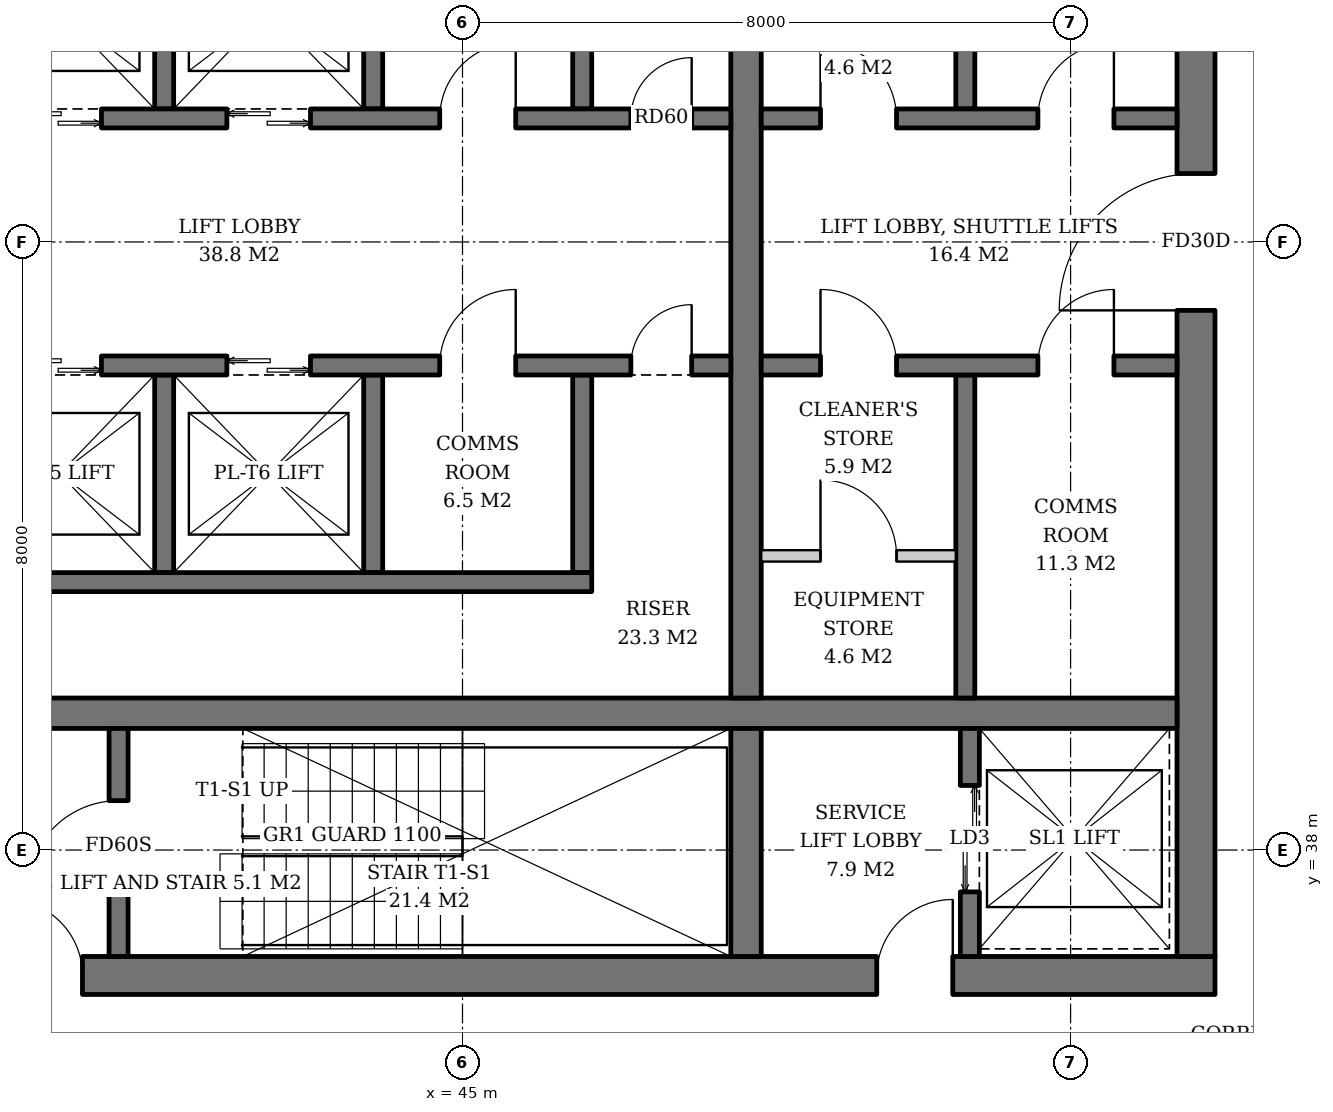
"""IFC4 building model, lengths in metres.
Left out: names, types, materials, properties, quantities, classifications, styles, units other than length and angle.
Written with IfcOpenShell. Run it as: python <this file> out.ifc"""

import sys

from ifc_helpers import new_model, si_unit, direction, frame, frame_2d, origin, place, context, subcontext, project, spatial, rectangle, extrude, element, fill, save


model = new_model("IFC4")
c1 = context("Model", 3, precision=1e-05, world=origin(), true_north=direction((0.0, 1.0)))
c2 = subcontext(c1, "Body", "Model", "MODEL_VIEW")
j1 = project(units=[si_unit("LENGTHUNIT", "METRE"), si_unit("PLANEANGLEUNIT", "RADIAN")], contexts=[c1])
p1 = place(None, origin())
s1 = spatial("IfcSite", under=j1, at=p1, CompositionType="ELEMENT")
p2 = place(p1, origin())
s2 = spatial("IfcBuilding", under=s1, at=p2, CompositionType="ELEMENT")
p3 = place(p2, frame((0.0, 0.0, 249.0)))
s3 = spatial("IfcBuildingStorey", under=s2, at=p3, CompositionType="ELEMENT", Elevation=249.0)
p4 = place(p3, frame((35.1, 36.35, 0.0), z_axis=(0.0, 0.0, 1.0), x_axis=(1.0, 0.0, 0.0)))
e1 = element("IfcWall", 1, at=p4, inside=s3, PredefinedType="SHEAR", context=c2, shape_type="SweptSolid", body=[
    extrude(rectangle(XDim=19.8, YDim=0.5, at=frame_2d((9.9, 0.0))), origin(), (0.0, 0.0, 1.0), 3.8),
])
p5 = place(p4, frame((3.9, 0.0, 0.0)))
e2 = element("IfcOpeningElement", 2, at=p5, cuts=e1, PredefinedType="OPENING", context=c2, shape_type="SweptSolid", body=[
    extrude(rectangle(XDim=1.0, YDim=2.1, at=frame_2d((0.5, 1.05))), frame((0.0, 0.26, 0.0), z_axis=(0.0, -1.0, 0.0), x_axis=(1.0, 0.0, 0.0)), (0.0, 0.0, 1.0), 0.52),
])
p6 = place(p4, frame((15.35, 0.0, 0.0)))
e3 = element("IfcOpeningElement", 3, at=p6, cuts=e1, PredefinedType="OPENING", context=c2, shape_type="SweptSolid", body=[
    extrude(rectangle(XDim=1.0, YDim=2.1, at=frame_2d((0.5, 1.05))), frame((0.0, 0.26, 0.0), z_axis=(0.0, -1.0, 0.0), x_axis=(1.0, 0.0, 0.0)), (0.0, 0.0, 1.0), 0.52),
])
p7 = place(p3, frame((54.65, 36.6, 0.0), z_axis=(0.0, 0.0, 1.0), x_axis=(0.0, 1.0, 0.0)))
e4 = element("IfcWall", 4, at=p7, inside=s3, PredefinedType="SHEAR", context=c2, shape_type="SweptSolid", body=[
    extrude(rectangle(XDim=18.8, YDim=0.5, at=frame_2d((9.4, 0.0))), origin(), (0.0, 0.0, 1.0), 3.8),
])
p8 = place(p7, frame((8.5, 0.0, 0.0)))
e5 = element("IfcOpeningElement", 5, at=p8, cuts=e4, PredefinedType="OPENING", context=c2, shape_type="SweptSolid", body=[
    extrude(rectangle(XDim=1.8, YDim=2.4, at=frame_2d((0.9, 1.2))), frame((0.0, 0.26, 0.0), z_axis=(0.0, -1.0, 0.0), x_axis=(1.0, 0.0, 0.0)), (0.0, 0.0, 1.0), 0.52),
])
p9 = place(p3, frame((35.6, 39.8, 0.0), z_axis=(0.0, 0.0, 1.0), x_axis=(1.0, 0.0, 0.0)))
e6 = element("IfcWall", 6, at=p9, inside=s3, PredefinedType="SHEAR", context=c2, shape_type="SweptSolid", body=[
    extrude(rectangle(XDim=18.8, YDim=0.4, at=frame_2d((9.4, 0.0))), origin(), (0.0, 0.0, 1.0), 3.8),
])
p10 = place(p3, frame((48.73, 36.6, 0.0), z_axis=(0.0, 0.0, 1.0), x_axis=(0.0, 1.0, 0.0)))
e7 = element("IfcWall", 7, at=p10, inside=s3, PredefinedType="SHEAR", context=c2, shape_type="SweptSolid", body=[
    extrude(rectangle(XDim=3.0, YDim=0.4, at=frame_2d((1.5, 0.0))), origin(), (0.0, 0.0, 1.0), 3.8),
])
p11 = place(p3, frame((48.73, 40.0, 0.0), z_axis=(0.0, 0.0, 1.0), x_axis=(0.0, 1.0, 0.0)))
e8 = element("IfcWall", 8, at=p11, inside=s3, PredefinedType="SHEAR", context=c2, shape_type="SweptSolid", body=[
    extrude(rectangle(XDim=12.0, YDim=0.4, at=frame_2d((6.0, 0.0))), origin(), (0.0, 0.0, 1.0), 3.8),
])
p12 = place(p3, frame((40.475, 36.6, 0.0), z_axis=(0.0, 0.0, 1.0), x_axis=(0.0, 1.0, 0.0)))
e9 = element("IfcWall", 9, at=p12, inside=s3, PredefinedType="SHEAR", context=c2, shape_type="SweptSolid", body=[
    extrude(rectangle(XDim=3.0, YDim=0.25, at=frame_2d((1.5, 0.0))), origin(), (0.0, 0.0, 1.0), 3.8),
])
p13 = place(p12, frame((0.85, 0.0, 0.0)))
e10 = element("IfcOpeningElement", 10, at=p13, cuts=e9, PredefinedType="OPENING", context=c2, shape_type="SweptSolid", body=[
    extrude(rectangle(XDim=1.2, YDim=2.1, at=frame_2d((0.6, 1.05))), frame((0.0, 0.135, 0.0), z_axis=(0.0, -1.0, 0.0), x_axis=(1.0, 0.0, 0.0)), (0.0, 0.0, 1.0), 0.27),
])
p14 = place(p3, frame((51.675, 36.6, 0.0), z_axis=(0.0, 0.0, 1.0), x_axis=(0.0, 1.0, 0.0)))
e11 = element("IfcWall", 11, at=p14, inside=s3, PredefinedType="SHEAR", context=c2, shape_type="SweptSolid", body=[
    extrude(rectangle(XDim=3.0, YDim=0.25, at=frame_2d((1.5, 0.0))), origin(), (0.0, 0.0, 1.0), 3.8),
])
p15 = place(p14, frame((0.85, 0.0, 0.0)))
e12 = element("IfcOpeningElement", 12, at=p15, cuts=e11, PredefinedType="OPENING", context=c2, shape_type="SweptSolid", body=[
    extrude(rectangle(XDim=1.4, YDim=2.4, at=frame_2d((0.7, 1.2))), frame((0.0, 0.135, 0.0), z_axis=(0.0, -1.0, 0.0), x_axis=(1.0, 0.0, 0.0)), (0.0, 0.0, 1.0), 0.27),
])
for number, where, z_axis, x_axis in (
    (13, (41.075, 47.75, 0.0), (0.0, 0.0, 1.0), (0.0, 1.0, 0.0)),
    (14, (43.825, 47.75, 0.0), (0.0, 0.0, 1.0), (0.0, 1.0, 0.0)),
    (15, (46.575, 47.75, 0.0), (0.0, 0.0, 1.0), (0.0, 1.0, 0.0)),
):
    element("IfcWall", number, at=place(p3, frame(where, z_axis=z_axis, x_axis=x_axis)), inside=s3, PredefinedType="SHEAR", context=c2, shape_type="SweptSolid", body=[
        extrude(rectangle(XDim=2.6, YDim=0.25, at=frame_2d((1.3, 0.0))), origin(), (0.0, 0.0, 1.0), 3.8),
    ])
p16 = place(p3, frame((35.6, 47.625, 0.0), z_axis=(0.0, 0.0, 1.0), x_axis=(1.0, 0.0, 0.0)))
e16 = element("IfcWall", 16, at=p16, inside=s3, PredefinedType="SHEAR", context=c2, shape_type="SweptSolid", body=[
    extrude(rectangle(XDim=12.93, YDim=0.25, at=frame_2d((6.465, 0.0))), origin(), (0.0, 0.0, 1.0), 3.8),
])
p17 = place(p16, frame((0.75, 0.0, 0.0)))
e17 = element("IfcOpeningElement", 17, at=p17, cuts=e16, PredefinedType="OPENING", context=c2, shape_type="SweptSolid", body=[
    extrude(rectangle(XDim=1.1, YDim=2.2, at=frame_2d((0.55, 1.1))), frame((0.0, 0.135, 0.0), z_axis=(0.0, -1.0, 0.0), x_axis=(1.0, 0.0, 0.0)), (0.0, 0.0, 1.0), 0.27),
])
p18 = place(p16, frame((3.55, 0.0, 0.0)))
e18 = element("IfcOpeningElement", 18, at=p18, cuts=e16, PredefinedType="OPENING", context=c2, shape_type="SweptSolid", body=[
    extrude(rectangle(XDim=1.1, YDim=2.2, at=frame_2d((0.55, 1.1))), frame((0.0, 0.135, 0.0), z_axis=(0.0, -1.0, 0.0), x_axis=(1.0, 0.0, 0.0)), (0.0, 0.0, 1.0), 0.27),
])
p19 = place(p16, frame((6.3, 0.0, 0.0)))
e19 = element("IfcOpeningElement", 19, at=p19, cuts=e16, PredefinedType="OPENING", context=c2, shape_type="SweptSolid", body=[
    extrude(rectangle(XDim=1.1, YDim=2.2, at=frame_2d((0.55, 1.1))), frame((0.0, 0.135, 0.0), z_axis=(0.0, -1.0, 0.0), x_axis=(1.0, 0.0, 0.0)), (0.0, 0.0, 1.0), 0.27),
])
p20 = place(p16, frame((9.1, 0.0, 0.0)))
e20 = element("IfcOpeningElement", 20, at=p20, cuts=e16, PredefinedType="OPENING", context=c2, shape_type="SweptSolid", body=[
    extrude(rectangle(XDim=1.0, YDim=2.1, at=frame_2d((0.5, 1.05))), frame((0.0, 0.135, 0.0), z_axis=(0.0, -1.0, 0.0), x_axis=(1.0, 0.0, 0.0)), (0.0, 0.0, 1.0), 0.27),
])
p21 = place(p16, frame((11.615, 0.0, 0.0)))
e21 = element("IfcOpeningElement", 21, at=p21, cuts=e16, PredefinedType="OPENING", context=c2, shape_type="SweptSolid", body=[
    extrude(rectangle(XDim=0.8, YDim=2.0, at=frame_2d((0.4, 1.0))), frame((0.0, 0.135, 0.0), z_axis=(0.0, -1.0, 0.0), x_axis=(1.0, 0.0, 0.0)), (0.0, 0.0, 1.0), 0.27),
])
for number, where, z_axis, x_axis in (
    (22, (41.075, 44.25, 0.0), (0.0, 0.0, 1.0), (0.0, -1.0, 0.0)),
    (23, (43.825, 44.25, 0.0), (0.0, 0.0, 1.0), (0.0, -1.0, 0.0)),
    (24, (46.575, 44.25, 0.0), (0.0, 0.0, 1.0), (0.0, -1.0, 0.0)),
):
    element("IfcWall", number, at=place(p3, frame(where, z_axis=z_axis, x_axis=x_axis)), inside=s3, PredefinedType="SHEAR", context=c2, shape_type="SweptSolid", body=[
        extrude(rectangle(XDim=2.6, YDim=0.25, at=frame_2d((1.3, 0.0))), origin(), (0.0, 0.0, 1.0), 3.8),
    ])
p22 = place(p3, frame((35.6, 41.525, 0.0), z_axis=(0.0, 0.0, 1.0), x_axis=(1.0, 0.0, 0.0)))
e25 = element("IfcWall", 25, at=p22, inside=s3, PredefinedType="SHEAR", context=c2, shape_type="SweptSolid", body=[
    extrude(rectangle(XDim=11.1, YDim=0.25, at=frame_2d((5.55, 0.0))), origin(), (0.0, 0.0, 1.0), 3.8),
])
p23 = place(p3, frame((35.6, 44.375, 0.0), z_axis=(0.0, 0.0, 1.0), x_axis=(1.0, 0.0, 0.0)))
e26 = element("IfcWall", 26, at=p23, inside=s3, PredefinedType="SHEAR", context=c2, shape_type="SweptSolid", body=[
    extrude(rectangle(XDim=12.93, YDim=0.25, at=frame_2d((6.465, 0.0))), origin(), (0.0, 0.0, 1.0), 3.8),
])
p24 = place(p23, frame((0.75, 0.0, 0.0)))
e27 = element("IfcOpeningElement", 27, at=p24, cuts=e26, PredefinedType="OPENING", context=c2, shape_type="SweptSolid", body=[
    extrude(rectangle(XDim=1.1, YDim=2.2, at=frame_2d((0.55, 1.1))), frame((0.0, 0.135, 0.0), z_axis=(0.0, -1.0, 0.0), x_axis=(1.0, 0.0, 0.0)), (0.0, 0.0, 1.0), 0.27),
])
p25 = place(p23, frame((3.55, 0.0, 0.0)))
e28 = element("IfcOpeningElement", 28, at=p25, cuts=e26, PredefinedType="OPENING", context=c2, shape_type="SweptSolid", body=[
    extrude(rectangle(XDim=1.1, YDim=2.2, at=frame_2d((0.55, 1.1))), frame((0.0, 0.135, 0.0), z_axis=(0.0, -1.0, 0.0), x_axis=(1.0, 0.0, 0.0)), (0.0, 0.0, 1.0), 0.27),
])
p26 = place(p23, frame((6.3, 0.0, 0.0)))
e29 = element("IfcOpeningElement", 29, at=p26, cuts=e26, PredefinedType="OPENING", context=c2, shape_type="SweptSolid", body=[
    extrude(rectangle(XDim=1.1, YDim=2.2, at=frame_2d((0.55, 1.1))), frame((0.0, 0.135, 0.0), z_axis=(0.0, -1.0, 0.0), x_axis=(1.0, 0.0, 0.0)), (0.0, 0.0, 1.0), 0.27),
])
p27 = place(p23, frame((9.1, 0.0, 0.0)))
e30 = element("IfcOpeningElement", 30, at=p27, cuts=e26, PredefinedType="OPENING", context=c2, shape_type="SweptSolid", body=[
    extrude(rectangle(XDim=1.0, YDim=2.1, at=frame_2d((0.5, 1.05))), frame((0.0, 0.135, 0.0), z_axis=(0.0, -1.0, 0.0), x_axis=(1.0, 0.0, 0.0)), (0.0, 0.0, 1.0), 0.27),
])
p28 = place(p23, frame((11.615, 0.0, 0.0)))
e31 = element("IfcOpeningElement", 31, at=p28, cuts=e26, PredefinedType="OPENING", context=c2, shape_type="SweptSolid", body=[
    extrude(rectangle(XDim=0.8, YDim=2.0, at=frame_2d((0.4, 1.0))), frame((0.0, 0.135, 0.0), z_axis=(0.0, -1.0, 0.0), x_axis=(1.0, 0.0, 0.0)), (0.0, 0.0, 1.0), 0.27),
])
p29 = place(p3, frame((51.615, 47.75, 0.0), z_axis=(0.0, 0.0, 1.0), x_axis=(0.0, 1.0, 0.0)))
e32 = element("IfcWall", 32, at=p29, inside=s3, PredefinedType="SHEAR", context=c2, shape_type="SweptSolid", body=[
    extrude(rectangle(XDim=4.25, YDim=0.25, at=frame_2d((2.125, 0.0))), origin(), (0.0, 0.0, 1.0), 3.8),
])
p30 = place(p3, frame((48.93, 47.625, 0.0), z_axis=(0.0, 0.0, 1.0), x_axis=(1.0, 0.0, 0.0)))
e33 = element("IfcWall", 33, at=p30, inside=s3, PredefinedType="SHEAR", context=c2, shape_type="SweptSolid", body=[
    extrude(rectangle(XDim=5.47, YDim=0.25, at=frame_2d((2.735, 0.0))), origin(), (0.0, 0.0, 1.0), 3.8),
])
p31 = place(p30, frame((0.78, 0.0, 0.0)))
e34 = element("IfcOpeningElement", 34, at=p31, cuts=e33, PredefinedType="OPENING", context=c2, shape_type="SweptSolid", body=[
    extrude(rectangle(XDim=1.0, YDim=2.1, at=frame_2d((0.5, 1.05))), frame((0.0, 0.135, 0.0), z_axis=(0.0, -1.0, 0.0), x_axis=(1.0, 0.0, 0.0)), (0.0, 0.0, 1.0), 0.27),
])
p32 = place(p30, frame((3.64, 0.0, 0.0)))
e35 = element("IfcOpeningElement", 35, at=p32, cuts=e33, PredefinedType="OPENING", context=c2, shape_type="SweptSolid", body=[
    extrude(rectangle(XDim=1.0, YDim=2.1, at=frame_2d((0.5, 1.05))), frame((0.0, 0.135, 0.0), z_axis=(0.0, -1.0, 0.0), x_axis=(1.0, 0.0, 0.0)), (0.0, 0.0, 1.0), 0.27),
])
p33 = place(p3, frame((51.615, 44.25, 0.0), z_axis=(0.0, 0.0, 1.0), x_axis=(0.0, -1.0, 0.0)))
e36 = element("IfcWall", 36, at=p33, inside=s3, PredefinedType="SHEAR", context=c2, shape_type="SweptSolid", body=[
    extrude(rectangle(XDim=4.25, YDim=0.25, at=frame_2d((2.125, 0.0))), origin(), (0.0, 0.0, 1.0), 3.8),
])
p34 = place(p3, frame((48.93, 44.375, 0.0), z_axis=(0.0, 0.0, 1.0), x_axis=(1.0, 0.0, 0.0)))
e37 = element("IfcWall", 37, at=p34, inside=s3, PredefinedType="SHEAR", context=c2, shape_type="SweptSolid", body=[
    extrude(rectangle(XDim=5.47, YDim=0.25, at=frame_2d((2.735, 0.0))), origin(), (0.0, 0.0, 1.0), 3.8),
])
p35 = place(p34, frame((0.78, 0.0, 0.0)))
e38 = element("IfcOpeningElement", 38, at=p35, cuts=e37, PredefinedType="OPENING", context=c2, shape_type="SweptSolid", body=[
    extrude(rectangle(XDim=1.0, YDim=2.1, at=frame_2d((0.5, 1.05))), frame((0.0, 0.135, 0.0), z_axis=(0.0, -1.0, 0.0), x_axis=(1.0, 0.0, 0.0)), (0.0, 0.0, 1.0), 0.27),
])
p36 = place(p34, frame((3.64, 0.0, 0.0)))
e39 = element("IfcOpeningElement", 39, at=p36, cuts=e37, PredefinedType="OPENING", context=c2, shape_type="SweptSolid", body=[
    extrude(rectangle(XDim=1.0, YDim=2.1, at=frame_2d((0.5, 1.05))), frame((0.0, 0.135, 0.0), z_axis=(0.0, -1.0, 0.0), x_axis=(1.0, 0.0, 0.0)), (0.0, 0.0, 1.0), 0.27),
])
p37 = place(p3, frame((48.93, 41.87, 0.0), z_axis=(0.0, 0.0, 1.0), x_axis=(1.0, 0.0, 0.0)))
e40 = element("IfcWall", 40, at=p37, inside=s3, PredefinedType="SOLIDWALL", context=c2, shape_type="SweptSolid", body=[
    extrude(rectangle(XDim=2.56, YDim=0.15, at=frame_2d((1.28, 0.0))), origin(), (0.0, 0.0, 1.0), 3.62),
])
p38 = place(p37, frame((0.78, 0.0, 0.0)))
e41 = element("IfcOpeningElement", 41, at=p38, cuts=e40, PredefinedType="OPENING", context=c2, shape_type="SweptSolid", body=[
    extrude(rectangle(XDim=1.0, YDim=2.1, at=frame_2d((0.5, 1.05))), frame((0.0, 0.085, 0.0), z_axis=(0.0, -1.0, 0.0), x_axis=(1.0, 0.0, 0.0)), (0.0, 0.0, 1.0), 0.17),
])
p39 = place(p13, origin())
e42 = element("IfcDoor", 42, at=p39, inside=s3, OperationType="SINGLE_SWING_LEFT", PredefinedType="DOOR", context=c2, shape_type="SweptSolid", body=[
    extrude(rectangle(XDim=1.2, YDim=2.1, at=frame_2d((0.6, 1.05))), frame((0.0, 0.025, 0.0), z_axis=(0.0, -1.0, 0.0), x_axis=(1.0, 0.0, 0.0)), (0.0, 0.0, 1.0), 0.05),
])
fill(e10, e42)
p40 = place(p15, origin())
e43 = element("IfcDoor", 43, at=p40, inside=s3, OperationType="DOUBLE_DOOR_SLIDING", PredefinedType="DOOR", context=c2, shape_type="SweptSolid", body=[
    extrude(rectangle(XDim=1.4, YDim=2.4, at=frame_2d((0.7, 1.2))), frame((0.0, 0.025, 0.0), z_axis=(0.0, -1.0, 0.0), x_axis=(1.0, 0.0, 0.0)), (0.0, 0.0, 1.0), 0.05),
])
fill(e12, e43)
p41 = place(p18, origin())
e44 = element("IfcDoor", 44, at=p41, inside=s3, OperationType="DOUBLE_DOOR_SLIDING", PredefinedType="DOOR", context=c2, shape_type="SweptSolid", body=[
    extrude(rectangle(XDim=1.1, YDim=2.2, at=frame_2d((0.55, 1.1))), frame((0.0, 0.025, 0.0), z_axis=(0.0, -1.0, 0.0), x_axis=(1.0, 0.0, 0.0)), (0.0, 0.0, 1.0), 0.05),
])
fill(e18, e44)
p42 = place(p19, origin())
e45 = element("IfcDoor", 45, at=p42, inside=s3, OperationType="DOUBLE_DOOR_SLIDING", PredefinedType="DOOR", context=c2, shape_type="SweptSolid", body=[
    extrude(rectangle(XDim=1.1, YDim=2.2, at=frame_2d((0.55, 1.1))), frame((0.0, 0.025, 0.0), z_axis=(0.0, -1.0, 0.0), x_axis=(1.0, 0.0, 0.0)), (0.0, 0.0, 1.0), 0.05),
])
fill(e19, e45)
p43 = place(p20, origin())
e46 = element("IfcDoor", 46, at=p43, inside=s3, OperationType="SINGLE_SWING_RIGHT", PredefinedType="DOOR", context=c2, shape_type="SweptSolid", body=[
    extrude(rectangle(XDim=1.0, YDim=2.1, at=frame_2d((0.5, 1.05))), frame((0.0, 0.025, 0.0), z_axis=(0.0, -1.0, 0.0), x_axis=(1.0, 0.0, 0.0)), (0.0, 0.0, 1.0), 0.05),
])
fill(e20, e46)
p44 = place(p21, origin())
e47 = element("IfcDoor", 47, at=p44, inside=s3, OperationType="SINGLE_SWING_RIGHT", PredefinedType="DOOR", context=c2, shape_type="SweptSolid", body=[
    extrude(rectangle(XDim=0.8, YDim=2.0, at=frame_2d((0.4, 1.0))), frame((0.0, 0.025, 0.0), z_axis=(0.0, -1.0, 0.0), x_axis=(1.0, 0.0, 0.0)), (0.0, 0.0, 1.0), 0.05),
])
fill(e21, e47)
p45 = place(p25, origin())
e48 = element("IfcDoor", 48, at=p45, inside=s3, OperationType="DOUBLE_DOOR_SLIDING", PredefinedType="DOOR", context=c2, shape_type="SweptSolid", body=[
    extrude(rectangle(XDim=1.1, YDim=2.2, at=frame_2d((0.55, 1.1))), frame((0.0, 0.025, 0.0), z_axis=(0.0, -1.0, 0.0), x_axis=(1.0, 0.0, 0.0)), (0.0, 0.0, 1.0), 0.05),
])
fill(e28, e48)
p46 = place(p26, origin())
e49 = element("IfcDoor", 49, at=p46, inside=s3, OperationType="DOUBLE_DOOR_SLIDING", PredefinedType="DOOR", context=c2, shape_type="SweptSolid", body=[
    extrude(rectangle(XDim=1.1, YDim=2.2, at=frame_2d((0.55, 1.1))), frame((0.0, 0.025, 0.0), z_axis=(0.0, -1.0, 0.0), x_axis=(1.0, 0.0, 0.0)), (0.0, 0.0, 1.0), 0.05),
])
fill(e29, e49)
p47 = place(p27, origin())
e50 = element("IfcDoor", 50, at=p47, inside=s3, OperationType="SINGLE_SWING_RIGHT", PredefinedType="DOOR", context=c2, shape_type="SweptSolid", body=[
    extrude(rectangle(XDim=1.0, YDim=2.1, at=frame_2d((0.5, 1.05))), frame((0.0, 0.025, 0.0), z_axis=(0.0, -1.0, 0.0), x_axis=(1.0, 0.0, 0.0)), (0.0, 0.0, 1.0), 0.05),
])
fill(e30, e50)
p48 = place(p28, origin())
e51 = element("IfcDoor", 51, at=p48, inside=s3, OperationType="SINGLE_SWING_RIGHT", PredefinedType="DOOR", context=c2, shape_type="SweptSolid", body=[
    extrude(rectangle(XDim=0.8, YDim=2.0, at=frame_2d((0.4, 1.0))), frame((0.0, 0.025, 0.0), z_axis=(0.0, -1.0, 0.0), x_axis=(1.0, 0.0, 0.0)), (0.0, 0.0, 1.0), 0.05),
])
fill(e31, e51)
p49 = place(p31, origin())
e52 = element("IfcDoor", 52, at=p49, inside=s3, OperationType="SINGLE_SWING_LEFT", PredefinedType="DOOR", context=c2, shape_type="SweptSolid", body=[
    extrude(rectangle(XDim=1.0, YDim=2.1, at=frame_2d((0.5, 1.05))), frame((0.0, 0.025, 0.0), z_axis=(0.0, -1.0, 0.0), x_axis=(1.0, 0.0, 0.0)), (0.0, 0.0, 1.0), 0.05),
])
fill(e34, e52)
p50 = place(p32, origin())
e53 = element("IfcDoor", 53, at=p50, inside=s3, OperationType="SINGLE_SWING_RIGHT", PredefinedType="DOOR", context=c2, shape_type="SweptSolid", body=[
    extrude(rectangle(XDim=1.0, YDim=2.1, at=frame_2d((0.5, 1.05))), frame((0.0, 0.025, 0.0), z_axis=(0.0, -1.0, 0.0), x_axis=(1.0, 0.0, 0.0)), (0.0, 0.0, 1.0), 0.05),
])
fill(e35, e53)
p51 = place(p35, origin())
e54 = element("IfcDoor", 54, at=p51, inside=s3, OperationType="SINGLE_SWING_LEFT", PredefinedType="DOOR", context=c2, shape_type="SweptSolid", body=[
    extrude(rectangle(XDim=1.0, YDim=2.1, at=frame_2d((0.5, 1.05))), frame((0.0, 0.025, 0.0), z_axis=(0.0, -1.0, 0.0), x_axis=(1.0, 0.0, 0.0)), (0.0, 0.0, 1.0), 0.05),
])
fill(e38, e54)
p52 = place(p36, origin())
e55 = element("IfcDoor", 55, at=p52, inside=s3, OperationType="SINGLE_SWING_RIGHT", PredefinedType="DOOR", context=c2, shape_type="SweptSolid", body=[
    extrude(rectangle(XDim=1.0, YDim=2.1, at=frame_2d((0.5, 1.05))), frame((0.0, 0.025, 0.0), z_axis=(0.0, -1.0, 0.0), x_axis=(1.0, 0.0, 0.0)), (0.0, 0.0, 1.0), 0.05),
])
fill(e39, e55)
p53 = place(p38, origin())
e56 = element("IfcDoor", 56, at=p53, inside=s3, OperationType="SINGLE_SWING_LEFT", PredefinedType="DOOR", context=c2, shape_type="SweptSolid", body=[
    extrude(rectangle(XDim=1.0, YDim=2.1, at=frame_2d((0.5, 1.05))), frame((0.0, 0.025, 0.0), z_axis=(0.0, -1.0, 0.0), x_axis=(1.0, 0.0, 0.0)), (0.0, 0.0, 1.0), 0.05),
])
fill(e41, e56)
p54 = place(p5, origin())
e57 = element("IfcDoor", 57, at=p54, inside=s3, OperationType="SINGLE_SWING_LEFT", PredefinedType="DOOR", context=c2, shape_type="SweptSolid", body=[
    extrude(rectangle(XDim=1.0, YDim=2.1, at=frame_2d((0.5, 1.05))), frame((0.0, 0.025, 0.0), z_axis=(0.0, -1.0, 0.0), x_axis=(1.0, 0.0, 0.0)), (0.0, 0.0, 1.0), 0.05),
])
fill(e2, e57)
p55 = place(p8, origin())
e58 = element("IfcDoor", 58, at=p55, inside=s3, OperationType="DOUBLE_DOOR_SINGLE_SWING", PredefinedType="DOOR", context=c2, shape_type="SweptSolid", body=[
    extrude(rectangle(XDim=1.8, YDim=2.4, at=frame_2d((0.9, 1.2))), frame((0.0, 0.025, 0.0), z_axis=(0.0, -1.0, 0.0), x_axis=(1.0, 0.0, 0.0)), (0.0, 0.0, 1.0), 0.05),
])
fill(e5, e58)
p56 = place(p6, origin())
e59 = element("IfcDoor", 59, at=p56, inside=s3, OperationType="SINGLE_SWING_RIGHT", PredefinedType="DOOR", context=c2, shape_type="SweptSolid", body=[
    extrude(rectangle(XDim=1.0, YDim=2.1, at=frame_2d((0.5, 1.05))), frame((0.0, 0.025, 0.0), z_axis=(0.0, -1.0, 0.0), x_axis=(1.0, 0.0, 0.0)), (0.0, 0.0, 1.0), 0.05),
])
fill(e3, e59)
save(model, sys.argv[1])
